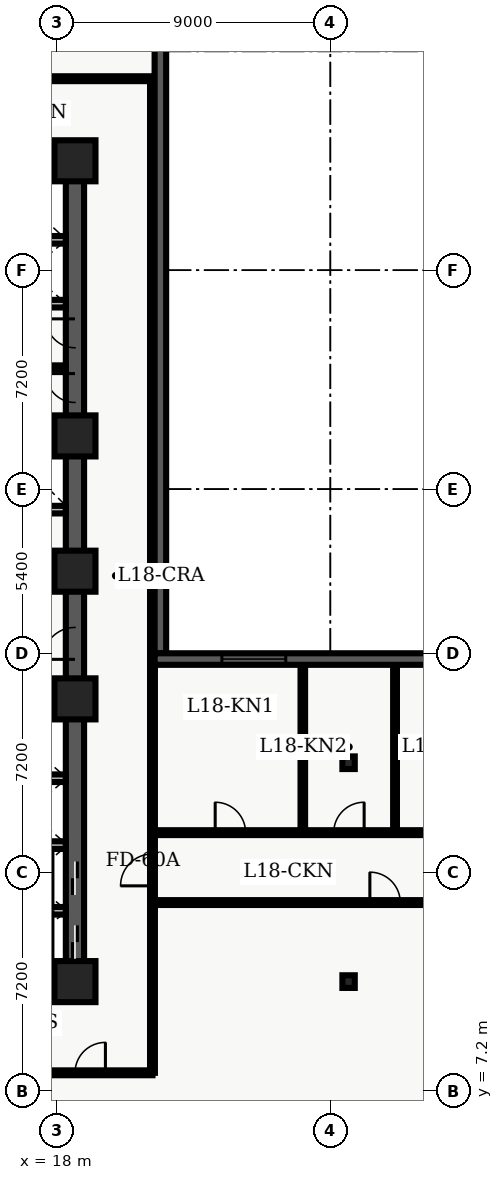
"""IFC4 building model, lengths in metres.
Left out: names, types, materials, properties, quantities, classifications, styles, units other than length and angle.
Written with IfcOpenShell. Run it as: python <this file> out.ifc"""

import sys

from ifc_helpers import new_model, entity, si_unit, converted_unit, direction, frame, origin_with_axes, origin_2d_with_axis, place, context, subcontext, project, spatial, polyline, rectangle, i_section, outline, extrude, element, fill, save


model = new_model("IFC4")
c1 = context("Model", 3, precision=1e-05, world=origin_with_axes(), true_north=direction((0.0, 1.0)))
c2 = subcontext(c1, "Body", "Model", "MODEL_VIEW")
j1 = project(units=[si_unit("LENGTHUNIT", "METRE"), converted_unit("PLANEANGLEUNIT", "DEGREE", entity("IfcPlaneAngleMeasure", 0.017), si_unit("PLANEANGLEUNIT", "RADIAN"), dimensions=[0, 0, 0, 0, 0, 0, 0])], contexts=[c1])
p1 = place(None, origin_with_axes())
s1 = spatial("IfcSite", under=j1, at=p1, CompositionType="ELEMENT")
p2 = place(p1, origin_with_axes())
s2 = spatial("IfcBuilding", under=s1, at=p2, CompositionType="ELEMENT")
p3 = place(p2, frame((0.0, 0.0, 75.6), z_axis=(0.0, 0.0, 1.0), x_axis=(1.0, 0.0, 0.0)))
s3 = spatial("IfcBuildingStorey", under=s2, at=p3, CompositionType="ELEMENT", Elevation=75.6)
p4 = place(p3, frame((11.4, 10.8, 0.0), z_axis=(0.0, 0.0, 1.0), x_axis=(1.0, 0.0, 0.0)))
e1 = element("IfcWall", 1, at=p4, inside=s3, PredefinedType="SHEAR", context=c2, shape_type="SweptSolid", body=[
    extrude(outline(polyline([(0.0, -0.3), (7.2, -0.3), (7.2, 0.3), (0.0, 0.3), (0.0, -0.3)])), origin_with_axes(), (0.0, 0.0, 1.0), 3.6),
])
p5 = place(p4, frame((2.625, 0.0, 0.0), z_axis=(0.0, 0.0, 1.0), x_axis=(1.0, 0.0, 0.0)))
e2 = element("IfcOpeningElement", 2, at=p5, cuts=e1, PredefinedType="OPENING", context=c2, shape_type="SweptSolid", body=[
    extrude(rectangle(XDim=1.05, YDim=0.62, at=origin_2d_with_axis()), origin_with_axes(), (0.0, 0.0, 1.0), 2.15),
])
p6 = place(p3, frame((11.4, 37.8, 0.0), z_axis=(0.0, 0.0, 1.0), x_axis=(1.0, 0.0, 0.0)))
e3 = element("IfcWall", 3, at=p6, inside=s3, PredefinedType="SHEAR", context=c2, shape_type="SweptSolid", body=[
    extrude(outline(polyline([(0.0, -0.3), (7.2, -0.3), (7.2, 0.3), (0.0, 0.3), (0.0, -0.3)])), origin_with_axes(), (0.0, 0.0, 1.0), 3.6),
])
p7 = place(p6, frame((2.625, 0.0, 0.0), z_axis=(0.0, 0.0, 1.0), x_axis=(1.0, 0.0, 0.0)))
e4 = element("IfcOpeningElement", 4, at=p7, cuts=e3, PredefinedType="OPENING", context=c2, shape_type="SweptSolid", body=[
    extrude(rectangle(XDim=1.05, YDim=0.62, at=origin_2d_with_axis()), origin_with_axes(), (0.0, 0.0, 1.0), 2.15),
])
p8 = place(p3, frame((18.6, 10.8, 0.0), z_axis=(0.0, 0.0, 1.0), x_axis=(0.0, 1.0, 0.0)))
e5 = element("IfcWall", 5, at=p8, inside=s3, PredefinedType="SHEAR", context=c2, shape_type="SweptSolid", body=[
    extrude(outline(polyline([(0.0, -0.3), (13.5, -0.3), (13.5, 0.3), (0.0, 0.3), (0.0, -0.3)])), origin_with_axes(), (0.0, 0.0, 1.0), 3.6),
])
p9 = place(p8, frame((1.3, 0.0, 0.0), z_axis=(0.0, 0.0, 1.0), x_axis=(1.0, 0.0, 0.0)))
e6 = element("IfcOpeningElement", 6, at=p9, cuts=e5, PredefinedType="OPENING", context=c2, shape_type="SweptSolid", body=[
    extrude(rectangle(XDim=1.1, YDim=0.62, at=origin_2d_with_axis()), origin_with_axes(), (0.0, 0.0, 1.0), 2.15),
])
p10 = place(p8, frame((3.4, 0.0, 0.0), z_axis=(0.0, 0.0, 1.0), x_axis=(1.0, 0.0, 0.0)))
e7 = element("IfcOpeningElement", 7, at=p10, cuts=e5, PredefinedType="OPENING", context=c2, shape_type="SweptSolid", body=[
    extrude(rectangle(XDim=1.1, YDim=0.62, at=origin_2d_with_axis()), origin_with_axes(), (0.0, 0.0, 1.0), 2.15),
])
p11 = place(p8, frame((11.125, 0.0, 0.0), z_axis=(0.0, 0.0, 1.0), x_axis=(1.0, 0.0, 0.0)))
e8 = element("IfcOpeningElement", 8, at=p11, cuts=e5, PredefinedType="OPENING", context=c2, shape_type="SweptSolid", body=[
    extrude(rectangle(XDim=1.05, YDim=0.62, at=origin_2d_with_axis()), origin_with_axes(), (0.0, 0.0, 1.0), 2.15),
])
p12 = place(p3, frame((18.6, 24.3, 0.0), z_axis=(0.0, 0.0, 1.0), x_axis=(0.0, 1.0, 0.0)))
e9 = element("IfcWall", 9, at=p12, inside=s3, PredefinedType="SHEAR", context=c2, shape_type="SweptSolid", body=[
    extrude(outline(polyline([(0.0, -0.3), (13.5, -0.3), (13.5, 0.3), (0.0, 0.3), (0.0, -0.3)])), origin_with_axes(), (0.0, 0.0, 1.0), 3.6),
])
p13 = place(p12, frame((6.025, 0.0, 0.0), z_axis=(0.0, 0.0, 1.0), x_axis=(1.0, 0.0, 0.0)))
e10 = element("IfcOpeningElement", 10, at=p13, cuts=e9, PredefinedType="OPENING", context=c2, shape_type="SweptSolid", body=[
    extrude(rectangle(XDim=0.95, YDim=0.62, at=origin_2d_with_axis()), origin_with_axes(), (0.0, 0.0, 1.0), 2.15),
])
p14 = place(p12, frame((7.825, 0.0, 0.0), z_axis=(0.0, 0.0, 1.0), x_axis=(1.0, 0.0, 0.0)))
e11 = element("IfcOpeningElement", 11, at=p14, cuts=e9, PredefinedType="OPENING", context=c2, shape_type="SweptSolid", body=[
    extrude(rectangle(XDim=0.95, YDim=0.62, at=origin_2d_with_axis()), origin_with_axes(), (0.0, 0.0, 1.0), 2.15),
])
for number, where, z_axis, x_axis in (
    (12, (11.7, 19.825, 0.0), (0.0, 0.0, 1.0), (1.0, 0.0, 0.0)),
    (13, (11.7, 28.775, 0.0), (0.0, 0.0, 1.0), (1.0, 0.0, 0.0)),
):
    element("IfcWall", number, at=place(p3, frame(where, z_axis=z_axis, x_axis=x_axis)), inside=s3, PredefinedType="SHEAR", context=c2, shape_type="SweptSolid", body=[
        extrude(outline(polyline([(0.0, -0.125), (6.6, -0.125), (6.6, 0.125), (0.0, 0.125), (0.0, -0.125)])), origin_with_axes(), (0.0, 0.0, 1.0), 3.6),
    ])
p15 = place(p3, frame((11.7, 24.1, 0.0), z_axis=(0.0, 0.0, 1.0), x_axis=(1.0, 0.0, 0.0)))
e14 = element("IfcWall", 14, at=p15, inside=s3, PredefinedType="SOLIDWALL", context=c2, shape_type="SweptSolid", body=[
    extrude(outline(polyline([(0.0, -0.125), (6.6, -0.125), (6.6, 0.125), (0.0, 0.125), (0.0, -0.125)])), origin_with_axes(), (0.0, 0.0, 1.0), 2.64),
])
p16 = place(p15, frame((3.6, 0.0, 0.0), z_axis=(0.0, 0.0, 1.0), x_axis=(1.0, 0.0, 0.0)))
e15 = element("IfcOpeningElement", 15, at=p16, cuts=e14, PredefinedType="OPENING", context=c2, shape_type="SweptSolid", body=[
    extrude(rectangle(XDim=0.9, YDim=0.27, at=origin_2d_with_axis()), origin_with_axes(), (0.0, 0.0, 1.0), 2.15),
])
p17 = place(p15, frame((5.65, 0.0, 0.0), z_axis=(0.0, 0.0, 1.0), x_axis=(1.0, 0.0, 0.0)))
e16 = element("IfcOpeningElement", 16, at=p17, cuts=e14, PredefinedType="OPENING", context=c2, shape_type="SweptSolid", body=[
    extrude(rectangle(XDim=0.9, YDim=0.27, at=origin_2d_with_axis()), origin_with_axes(), (0.0, 0.0, 1.0), 2.15),
])
p18 = place(p3, frame((11.7, 26.325, 0.0), z_axis=(0.0, 0.0, 1.0), x_axis=(1.0, 0.0, 0.0)))
e17 = element("IfcWall", 17, at=p18, inside=s3, PredefinedType="SOLIDWALL", context=c2, shape_type="SweptSolid", body=[
    extrude(outline(polyline([(0.0, -0.125), (6.6, -0.125), (6.6, 0.125), (0.0, 0.125), (0.0, -0.125)])), origin_with_axes(), (0.0, 0.0, 1.0), 2.64),
])
p19 = place(p18, frame((3.5, 0.0, 0.0), z_axis=(0.0, 0.0, 1.0), x_axis=(1.0, 0.0, 0.0)))
e18 = element("IfcOpeningElement", 18, at=p19, cuts=e17, PredefinedType="OPENING", context=c2, shape_type="SweptSolid", body=[
    extrude(rectangle(XDim=0.9, YDim=0.27, at=origin_2d_with_axis()), origin_with_axes(), (0.0, 0.0, 1.0), 2.15),
])
for number, where, z_axis, x_axis in (
    (19, (18.6, 10.8, 0.0), (0.0, 0.0, 1.0), (1.0, 0.0, 0.0)),
    (20, (18.6, 20.1, 0.0), (0.0, 0.0, 1.0), (1.0, 0.0, 0.0)),
    (21, (18.6, 24.3, 0.0), (0.0, 0.0, 1.0), (1.0, 0.0, 0.0)),
    (22, (18.6, 28.75, 0.0), (0.0, 0.0, 1.0), (1.0, 0.0, 0.0)),
    (23, (18.6, 37.8, 0.0), (0.0, 0.0, 1.0), (1.0, 0.0, 0.0)),
):
    element("IfcColumn", number, at=place(p3, frame(where, z_axis=z_axis, x_axis=x_axis)), inside=s3, PredefinedType="COLUMN", context=c2, shape_type="SweptSolid", body=[
        extrude(rectangle(XDim=1.35, YDim=1.35, at=origin_2d_with_axis()), origin_with_axes(), (0.0, 0.0, 1.0), 3.9),
    ])
for number, where, z_axis, x_axis in (
    (24, (27.6, 10.8, 0.0), (0.0, 0.0, 1.0), (1.0, 0.0, 0.0)),
    (25, (27.6, 18.0, 0.0), (0.0, 0.0, 1.0), (1.0, 0.0, 0.0)),
):
    element("IfcColumn", number, at=place(p3, frame(where, z_axis=z_axis, x_axis=x_axis)), inside=s3, PredefinedType="COLUMN", context=c2, shape_type="SweptSolid", body=[
        extrude(i_section(OverallWidth=0.406, OverallDepth=0.416, WebThickness=0.03, FlangeThickness=0.048, FilletRadius=0.022, at=origin_2d_with_axis()), origin_with_axes(), (0.0, 0.0, 1.0), 3.9),
    ])
for number, where, z_axis, x_axis in (
    (26, (15.84, 13.13, 0.0), (0.0, 0.0, 1.0), (1.0, 0.0, 0.0)),
    (27, (15.84, 15.29, 0.0), (0.0, 0.0, 1.0), (1.0, 0.0, 0.0)),
    (28, (15.84, 17.49, 0.0), (0.0, 0.0, 1.0), (1.0, 0.0, 0.0)),
    (29, (15.84, 33.1, 0.0), (0.0, 0.0, 1.0), (1.0, 0.0, 0.0)),
    (30, (15.84, 35.2, 0.0), (0.0, 0.0, 1.0), (1.0, 0.0, 0.0)),
):
    element("IfcWall", number, at=place(p3, frame(where, z_axis=z_axis, x_axis=x_axis)), inside=s3, PredefinedType="SOLIDWALL", context=c2, shape_type="SweptSolid", body=[
        extrude(outline(polyline([(0.0, -0.125), (2.46, -0.125), (2.46, 0.125), (0.0, 0.125), (0.0, -0.125)])), origin_with_axes(), (0.0, 0.0, 1.0), 2.64),
    ])
p20 = place(p3, frame((15.84, 31.0, 0.0), z_axis=(0.0, 0.0, 1.0), x_axis=(1.0, 0.0, 0.0)))
e31 = element("IfcWall", 31, at=p20, inside=s3, PredefinedType="PARTITIONING", context=c2, shape_type="SweptSolid", body=[
    extrude(outline(polyline([(0.0, -0.07), (2.46, -0.07), (2.46, 0.07), (0.0, 0.07), (0.0, -0.07)])), origin_with_axes(), (0.0, 0.0, 1.0), 2.64),
])
p21 = place(p3, frame((2.6, 7.8, 0.0), z_axis=(0.0, 0.0, 1.0), x_axis=(1.0, 0.0, 0.0)))
e32 = element("IfcWall", 32, at=p21, inside=s3, PredefinedType="PARTITIONING", context=c2, shape_type="SweptSolid", body=[
    extrude(outline(polyline([(0.0, -0.08), (18.55, -0.08), (18.55, 0.08), (0.0, 0.08), (0.0, -0.08)])), origin_with_axes(), (0.0, 0.0, 1.0), 2.64),
])
p22 = place(p21, frame((0.894, 0.0, 0.0), z_axis=(0.0, 0.0, 1.0), x_axis=(1.0, 0.0, 0.0)))
e33 = element("IfcOpeningElement", 33, at=p22, cuts=e32, PredefinedType="OPENING", context=c2, shape_type="SweptSolid", body=[
    extrude(rectangle(XDim=1.0, YDim=0.18, at=origin_2d_with_axis()), origin_with_axes(), (0.0, 0.0, 1.0), 2.15),
])
p23 = place(p21, frame((6.55, 0.0, 0.0), z_axis=(0.0, 0.0, 1.0), x_axis=(1.0, 0.0, 0.0)))
e34 = element("IfcOpeningElement", 34, at=p23, cuts=e32, PredefinedType="OPENING", context=c2, shape_type="SweptSolid", body=[
    extrude(rectangle(XDim=1.0, YDim=0.18, at=origin_2d_with_axis()), origin_with_axes(), (0.0, 0.0, 1.0), 2.15),
])
p24 = place(p21, frame((11.932, 0.0, 0.0), z_axis=(0.0, 0.0, 1.0), x_axis=(1.0, 0.0, 0.0)))
e35 = element("IfcOpeningElement", 35, at=p24, cuts=e32, PredefinedType="OPENING", context=c2, shape_type="SweptSolid", body=[
    extrude(rectangle(XDim=1.0, YDim=0.18, at=origin_2d_with_axis()), origin_with_axes(), (0.0, 0.0, 1.0), 2.15),
])
p25 = place(p21, frame((16.502, 0.0, 0.0), z_axis=(0.0, 0.0, 1.0), x_axis=(1.0, 0.0, 0.0)))
e36 = element("IfcOpeningElement", 36, at=p25, cuts=e32, PredefinedType="OPENING", context=c2, shape_type="SweptSolid", body=[
    extrude(rectangle(XDim=1.0, YDim=0.18, at=origin_2d_with_axis()), origin_with_axes(), (0.0, 0.0, 1.0), 2.15),
])
p26 = place(p3, frame((2.6, 40.5, 0.0), z_axis=(0.0, 0.0, 1.0), x_axis=(1.0, 0.0, 0.0)))
e37 = element("IfcWall", 37, at=p26, inside=s3, PredefinedType="PARTITIONING", context=c2, shape_type="SweptSolid", body=[
    extrude(outline(polyline([(0.0, -0.08), (18.65, -0.08), (18.65, 0.08), (0.0, 0.08), (0.0, -0.08)])), origin_with_axes(), (0.0, 0.0, 1.0), 2.64),
])
p27 = place(p26, frame((0.992, 0.0, 0.0), z_axis=(0.0, 0.0, 1.0), x_axis=(1.0, 0.0, 0.0)))
e38 = element("IfcOpeningElement", 38, at=p27, cuts=e37, PredefinedType="OPENING", context=c2, shape_type="SweptSolid", body=[
    extrude(rectangle(XDim=1.0, YDim=0.18, at=origin_2d_with_axis()), origin_with_axes(), (0.0, 0.0, 1.0), 2.15),
])
p28 = place(p26, frame((7.186, 0.0, 0.0), z_axis=(0.0, 0.0, 1.0), x_axis=(1.0, 0.0, 0.0)))
e39 = element("IfcOpeningElement", 39, at=p28, cuts=e37, PredefinedType="OPENING", context=c2, shape_type="SweptSolid", body=[
    extrude(rectangle(XDim=1.0, YDim=0.18, at=origin_2d_with_axis()), origin_with_axes(), (0.0, 0.0, 1.0), 2.15),
])
p29 = place(p26, frame((13.148, 0.0, 0.0), z_axis=(0.0, 0.0, 1.0), x_axis=(1.0, 0.0, 0.0)))
e40 = element("IfcOpeningElement", 40, at=p29, cuts=e37, PredefinedType="OPENING", context=c2, shape_type="SweptSolid", body=[
    extrude(rectangle(XDim=1.0, YDim=0.18, at=origin_2d_with_axis()), origin_with_axes(), (0.0, 0.0, 1.0), 2.15),
])
p30 = place(p3, frame((21.15, 7.8, 0.0), z_axis=(0.0, 0.0, 1.0), x_axis=(0.0, 1.0, 0.0)))
e41 = element("IfcWall", 41, at=p30, inside=s3, PredefinedType="PARTITIONING", context=c2, shape_type="SweptSolid", body=[
    extrude(outline(polyline([(0.0, -0.08), (32.7, -0.08), (32.7, 0.08), (0.0, 0.08), (0.0, -0.08)])), origin_with_axes(), (0.0, 0.0, 1.0), 2.64),
])
p31 = place(p30, frame((6.675, 0.0, 0.0), z_axis=(0.0, 0.0, 1.0), x_axis=(1.0, 0.0, 0.0)))
e42 = element("IfcOpeningElement", 42, at=p31, cuts=e41, PredefinedType="OPENING", context=c2, shape_type="SweptSolid", body=[
    extrude(rectangle(XDim=1.05, YDim=0.18, at=origin_2d_with_axis()), origin_with_axes(), (0.0, 0.0, 1.0), 2.15),
])
p32 = place(p3, frame((21.15, 13.4, 0.0), z_axis=(0.0, 0.0, 1.0), x_axis=(1.0, 0.0, 0.0)))
e43 = element("IfcWall", 43, at=p32, inside=s3, PredefinedType="PARTITIONING", context=c2, shape_type="SweptSolid", body=[
    extrude(outline(polyline([(0.0, -0.08), (15.2, -0.08), (15.2, 0.08), (0.0, 0.08), (0.0, -0.08)])), origin_with_axes(), (0.0, 0.0, 1.0), 2.64),
])
p33 = place(p32, frame((7.65, 0.0, 0.0), z_axis=(0.0, 0.0, 1.0), x_axis=(1.0, 0.0, 0.0)))
e44 = element("IfcOpeningElement", 44, at=p33, cuts=e43, PredefinedType="OPENING", context=c2, shape_type="SweptSolid", body=[
    extrude(rectangle(XDim=1.0, YDim=0.18, at=origin_2d_with_axis()), origin_with_axes(), (0.0, 0.0, 1.0), 2.15),
])
p34 = place(p3, frame((21.15, 15.7, 0.0), z_axis=(0.0, 0.0, 1.0), x_axis=(1.0, 0.0, 0.0)))
e45 = element("IfcWall", 45, at=p34, inside=s3, PredefinedType="PARTITIONING", context=c2, shape_type="SweptSolid", body=[
    extrude(outline(polyline([(0.0, -0.08), (15.2, -0.08), (15.2, 0.08), (0.0, 0.08), (0.0, -0.08)])), origin_with_axes(), (0.0, 0.0, 1.0), 2.64),
])
p35 = place(p34, frame((2.562, 0.0, 0.0), z_axis=(0.0, 0.0, 1.0), x_axis=(1.0, 0.0, 0.0)))
e46 = element("IfcOpeningElement", 46, at=p35, cuts=e45, PredefinedType="OPENING", context=c2, shape_type="SweptSolid", body=[
    extrude(rectangle(XDim=1.0, YDim=0.18, at=origin_2d_with_axis()), origin_with_axes(), (0.0, 0.0, 1.0), 2.15),
])
p36 = place(p34, frame((6.462, 0.0, 0.0), z_axis=(0.0, 0.0, 1.0), x_axis=(1.0, 0.0, 0.0)))
e47 = element("IfcOpeningElement", 47, at=p36, cuts=e45, PredefinedType="OPENING", context=c2, shape_type="SweptSolid", body=[
    extrude(rectangle(XDim=1.0, YDim=0.18, at=origin_2d_with_axis()), origin_with_axes(), (0.0, 0.0, 1.0), 2.15),
])
p37 = place(p34, frame((9.634, 0.0, 0.0), z_axis=(0.0, 0.0, 1.0), x_axis=(1.0, 0.0, 0.0)))
e48 = element("IfcOpeningElement", 48, at=p37, cuts=e45, PredefinedType="OPENING", context=c2, shape_type="SweptSolid", body=[
    extrude(rectangle(XDim=1.0, YDim=0.18, at=origin_2d_with_axis()), origin_with_axes(), (0.0, 0.0, 1.0), 2.15),
])
p38 = place(p34, frame((13.205, 0.0, 0.0), z_axis=(0.0, 0.0, 1.0), x_axis=(1.0, 0.0, 0.0)))
e49 = element("IfcOpeningElement", 49, at=p38, cuts=e45, PredefinedType="OPENING", context=c2, shape_type="SweptSolid", body=[
    extrude(rectangle(XDim=1.0, YDim=0.18, at=origin_2d_with_axis()), origin_with_axes(), (0.0, 0.0, 1.0), 2.15),
])
p39 = place(p3, frame((26.095, 15.82, 0.0), z_axis=(0.0, 0.0, 1.0), x_axis=(0.0, 1.0, 0.0)))
e50 = element("IfcWall", 50, at=p39, inside=s3, PredefinedType="PARTITIONING", context=c2, shape_type="SweptSolid", body=[
    extrude(outline(polyline([(0.0, -0.075), (5.405, -0.075), (5.405, 0.075), (0.0, 0.075), (0.0, -0.075)])), origin_with_axes(), (0.0, 0.0, 1.0), 2.64),
])
p40 = place(p3, frame((29.128, 15.82, 0.0), z_axis=(0.0, 0.0, 1.0), x_axis=(0.0, 1.0, 0.0)))
e51 = element("IfcWall", 51, at=p40, inside=s3, PredefinedType="PARTITIONING", context=c2, shape_type="SweptSolid", body=[
    extrude(outline(polyline([(0.0, -0.062), (5.405, -0.062), (5.405, 0.062), (0.0, 0.062), (0.0, -0.062)])), origin_with_axes(), (0.0, 0.0, 1.0), 2.64),
])
p41 = place(p3, frame((21.41, 45.82, 0.0), z_axis=(0.0, 0.0, 1.0), x_axis=(0.0, -1.0, 0.0)))
e52 = element("IfcWall", 52, at=p41, inside=s3, PredefinedType="SOLIDWALL", context=c2, shape_type="SweptSolid", body=[
    extrude(outline(polyline([(0.0, -0.19), (24.22, -0.19), (24.22, 0.19), (0.0, 0.19), (0.0, -0.19)])), origin_with_axes(), (0.0, 0.0, 1.0), 3.6),
])
p42 = place(p41, frame((2.902, 0.0, 0.45), z_axis=(0.0, 0.0, 1.0), x_axis=(1.0, 0.0, 0.0)))
e53 = element("IfcOpeningElement", 53, at=p42, cuts=e52, PredefinedType="OPENING", context=c2, shape_type="SweptSolid", body=[
    extrude(rectangle(XDim=2.1, YDim=0.4, at=origin_2d_with_axis()), origin_with_axes(), (0.0, 0.0, 1.0), 2.2),
])
p43 = place(p3, frame((21.22, 21.41, 0.0), z_axis=(0.0, 0.0, 1.0), x_axis=(1.0, 0.0, 0.0)))
e54 = element("IfcWall", 54, at=p43, inside=s3, PredefinedType="SOLIDWALL", context=c2, shape_type="SweptSolid", body=[
    extrude(outline(polyline([(0.0, -0.19), (17.18, -0.19), (17.18, 0.19), (0.0, 0.19), (0.0, -0.19)])), origin_with_axes(), (0.0, 0.0, 1.0), 3.6),
])
p44 = place(p43, frame((3.263, 0.0, 0.45), z_axis=(0.0, 0.0, 1.0), x_axis=(1.0, 0.0, 0.0)))
e55 = element("IfcOpeningElement", 55, at=p44, cuts=e54, PredefinedType="OPENING", context=c2, shape_type="SweptSolid", body=[
    extrude(rectangle(XDim=2.1, YDim=0.4, at=origin_2d_with_axis()), origin_with_axes(), (0.0, 0.0, 1.0), 2.2),
])
p45 = place(p43, frame((13.467, 0.0, 0.45), z_axis=(0.0, 0.0, 1.0), x_axis=(1.0, 0.0, 0.0)))
e56 = element("IfcOpeningElement", 56, at=p45, cuts=e54, PredefinedType="OPENING", context=c2, shape_type="SweptSolid", body=[
    extrude(rectangle(XDim=2.1, YDim=0.4, at=origin_2d_with_axis()), origin_with_axes(), (0.0, 0.0, 1.0), 2.2),
])
p46 = place(p8, frame((1.3, 0.0, 0.0), z_axis=(0.0, 0.0, 1.0), x_axis=(1.0, 0.0, 0.0)))
e57 = element("IfcDoor", 57, at=p46, inside=s3, OperationType="SLIDING_TO_LEFT", PredefinedType="DOOR", context=c2, shape_type="SweptSolid", body=[
    extrude(rectangle(XDim=1.1, YDim=0.09, at=origin_2d_with_axis()), origin_with_axes(), (0.0, 0.0, 1.0), 2.15),
])
fill(e6, e57)
p47 = place(p8, frame((3.4, 0.0, 0.0), z_axis=(0.0, 0.0, 1.0), x_axis=(1.0, 0.0, 0.0)))
e58 = element("IfcDoor", 58, at=p47, inside=s3, OperationType="SLIDING_TO_RIGHT", PredefinedType="DOOR", context=c2, shape_type="SweptSolid", body=[
    extrude(rectangle(XDim=1.1, YDim=0.09, at=origin_2d_with_axis()), origin_with_axes(), (0.0, 0.0, 1.0), 2.15),
])
fill(e7, e58)
p48 = place(p8, frame((11.125, 0.0, 0.0), z_axis=(0.0, 0.0, 1.0), x_axis=(1.0, 0.0, 0.0)))
e59 = element("IfcDoor", 59, at=p48, inside=s3, OperationType="SINGLE_SWING_LEFT", PredefinedType="DOOR", context=c2, shape_type="SweptSolid", body=[
    extrude(rectangle(XDim=1.05, YDim=0.09, at=origin_2d_with_axis()), origin_with_axes(), (0.0, 0.0, 1.0), 2.15),
])
fill(e8, e59)
p49 = place(p12, frame((6.025, 0.0, 0.0), z_axis=(0.0, 0.0, 1.0), x_axis=(1.0, 0.0, 0.0)))
e60 = element("IfcDoor", 60, at=p49, inside=s3, OperationType="SINGLE_SWING_RIGHT", PredefinedType="DOOR", context=c2, shape_type="SweptSolid", body=[
    extrude(rectangle(XDim=0.95, YDim=0.09, at=origin_2d_with_axis()), origin_with_axes(), (0.0, 0.0, 1.0), 2.15),
])
fill(e10, e60)
p50 = place(p12, frame((7.825, 0.0, 0.0), z_axis=(0.0, 0.0, 1.0), x_axis=(1.0, 0.0, 0.0)))
e61 = element("IfcDoor", 61, at=p50, inside=s3, OperationType="SINGLE_SWING_RIGHT", PredefinedType="DOOR", context=c2, shape_type="SweptSolid", body=[
    extrude(rectangle(XDim=0.95, YDim=0.09, at=origin_2d_with_axis()), origin_with_axes(), (0.0, 0.0, 1.0), 2.15),
])
fill(e11, e61)
p51 = place(p21, frame((16.502, 0.0, 0.0), z_axis=(0.0, 0.0, 1.0), x_axis=(1.0, 0.0, 0.0)))
e62 = element("IfcDoor", 62, at=p51, inside=s3, OperationType="SINGLE_SWING_RIGHT", PredefinedType="DOOR", context=c2, shape_type="SweptSolid", body=[
    extrude(rectangle(XDim=1.0, YDim=0.09, at=origin_2d_with_axis()), origin_with_axes(), (0.0, 0.0, 1.0), 2.15),
])
fill(e36, e62)
p52 = place(p30, frame((6.675, 0.0, 0.0), z_axis=(0.0, 0.0, 1.0), x_axis=(1.0, 0.0, 0.0)))
e63 = element("IfcDoor", 63, at=p52, inside=s3, OperationType="SINGLE_SWING_LEFT", PredefinedType="DOOR", context=c2, shape_type="SweptSolid", body=[
    extrude(rectangle(XDim=1.05, YDim=0.09, at=origin_2d_with_axis()), origin_with_axes(), (0.0, 0.0, 1.0), 2.15),
])
fill(e42, e63)
p53 = place(p32, frame((7.65, 0.0, 0.0), z_axis=(0.0, 0.0, 1.0), x_axis=(1.0, 0.0, 0.0)))
e64 = element("IfcDoor", 64, at=p53, inside=s3, OperationType="SINGLE_SWING_LEFT", PredefinedType="DOOR", context=c2, shape_type="SweptSolid", body=[
    extrude(rectangle(XDim=1.0, YDim=0.09, at=origin_2d_with_axis()), origin_with_axes(), (0.0, 0.0, 1.0), 2.15),
])
fill(e44, e64)
p54 = place(p34, frame((2.562, 0.0, 0.0), z_axis=(0.0, 0.0, 1.0), x_axis=(1.0, 0.0, 0.0)))
e65 = element("IfcDoor", 65, at=p54, inside=s3, OperationType="SINGLE_SWING_LEFT", PredefinedType="DOOR", context=c2, shape_type="SweptSolid", body=[
    extrude(rectangle(XDim=1.0, YDim=0.09, at=origin_2d_with_axis()), origin_with_axes(), (0.0, 0.0, 1.0), 2.15),
])
fill(e46, e65)
p55 = place(p34, frame((6.462, 0.0, 0.0), z_axis=(0.0, 0.0, 1.0), x_axis=(1.0, 0.0, 0.0)))
e66 = element("IfcDoor", 66, at=p55, inside=s3, OperationType="SINGLE_SWING_RIGHT", PredefinedType="DOOR", context=c2, shape_type="SweptSolid", body=[
    extrude(rectangle(XDim=1.0, YDim=0.09, at=origin_2d_with_axis()), origin_with_axes(), (0.0, 0.0, 1.0), 2.15),
])
fill(e47, e66)
p56 = place(p43, frame((3.263, 0.0, 0.45), z_axis=(0.0, 0.0, 1.0), x_axis=(1.0, 0.0, 0.0)))
e67 = element("IfcWindow", 67, at=p56, inside=s3, PredefinedType="WINDOW", context=c2, shape_type="SweptSolid", body=[
    extrude(rectangle(XDim=2.1, YDim=0.09, at=origin_2d_with_axis()), origin_with_axes(), (0.0, 0.0, 1.0), 2.2),
])
fill(e55, e67)
save(model, sys.argv[1])
